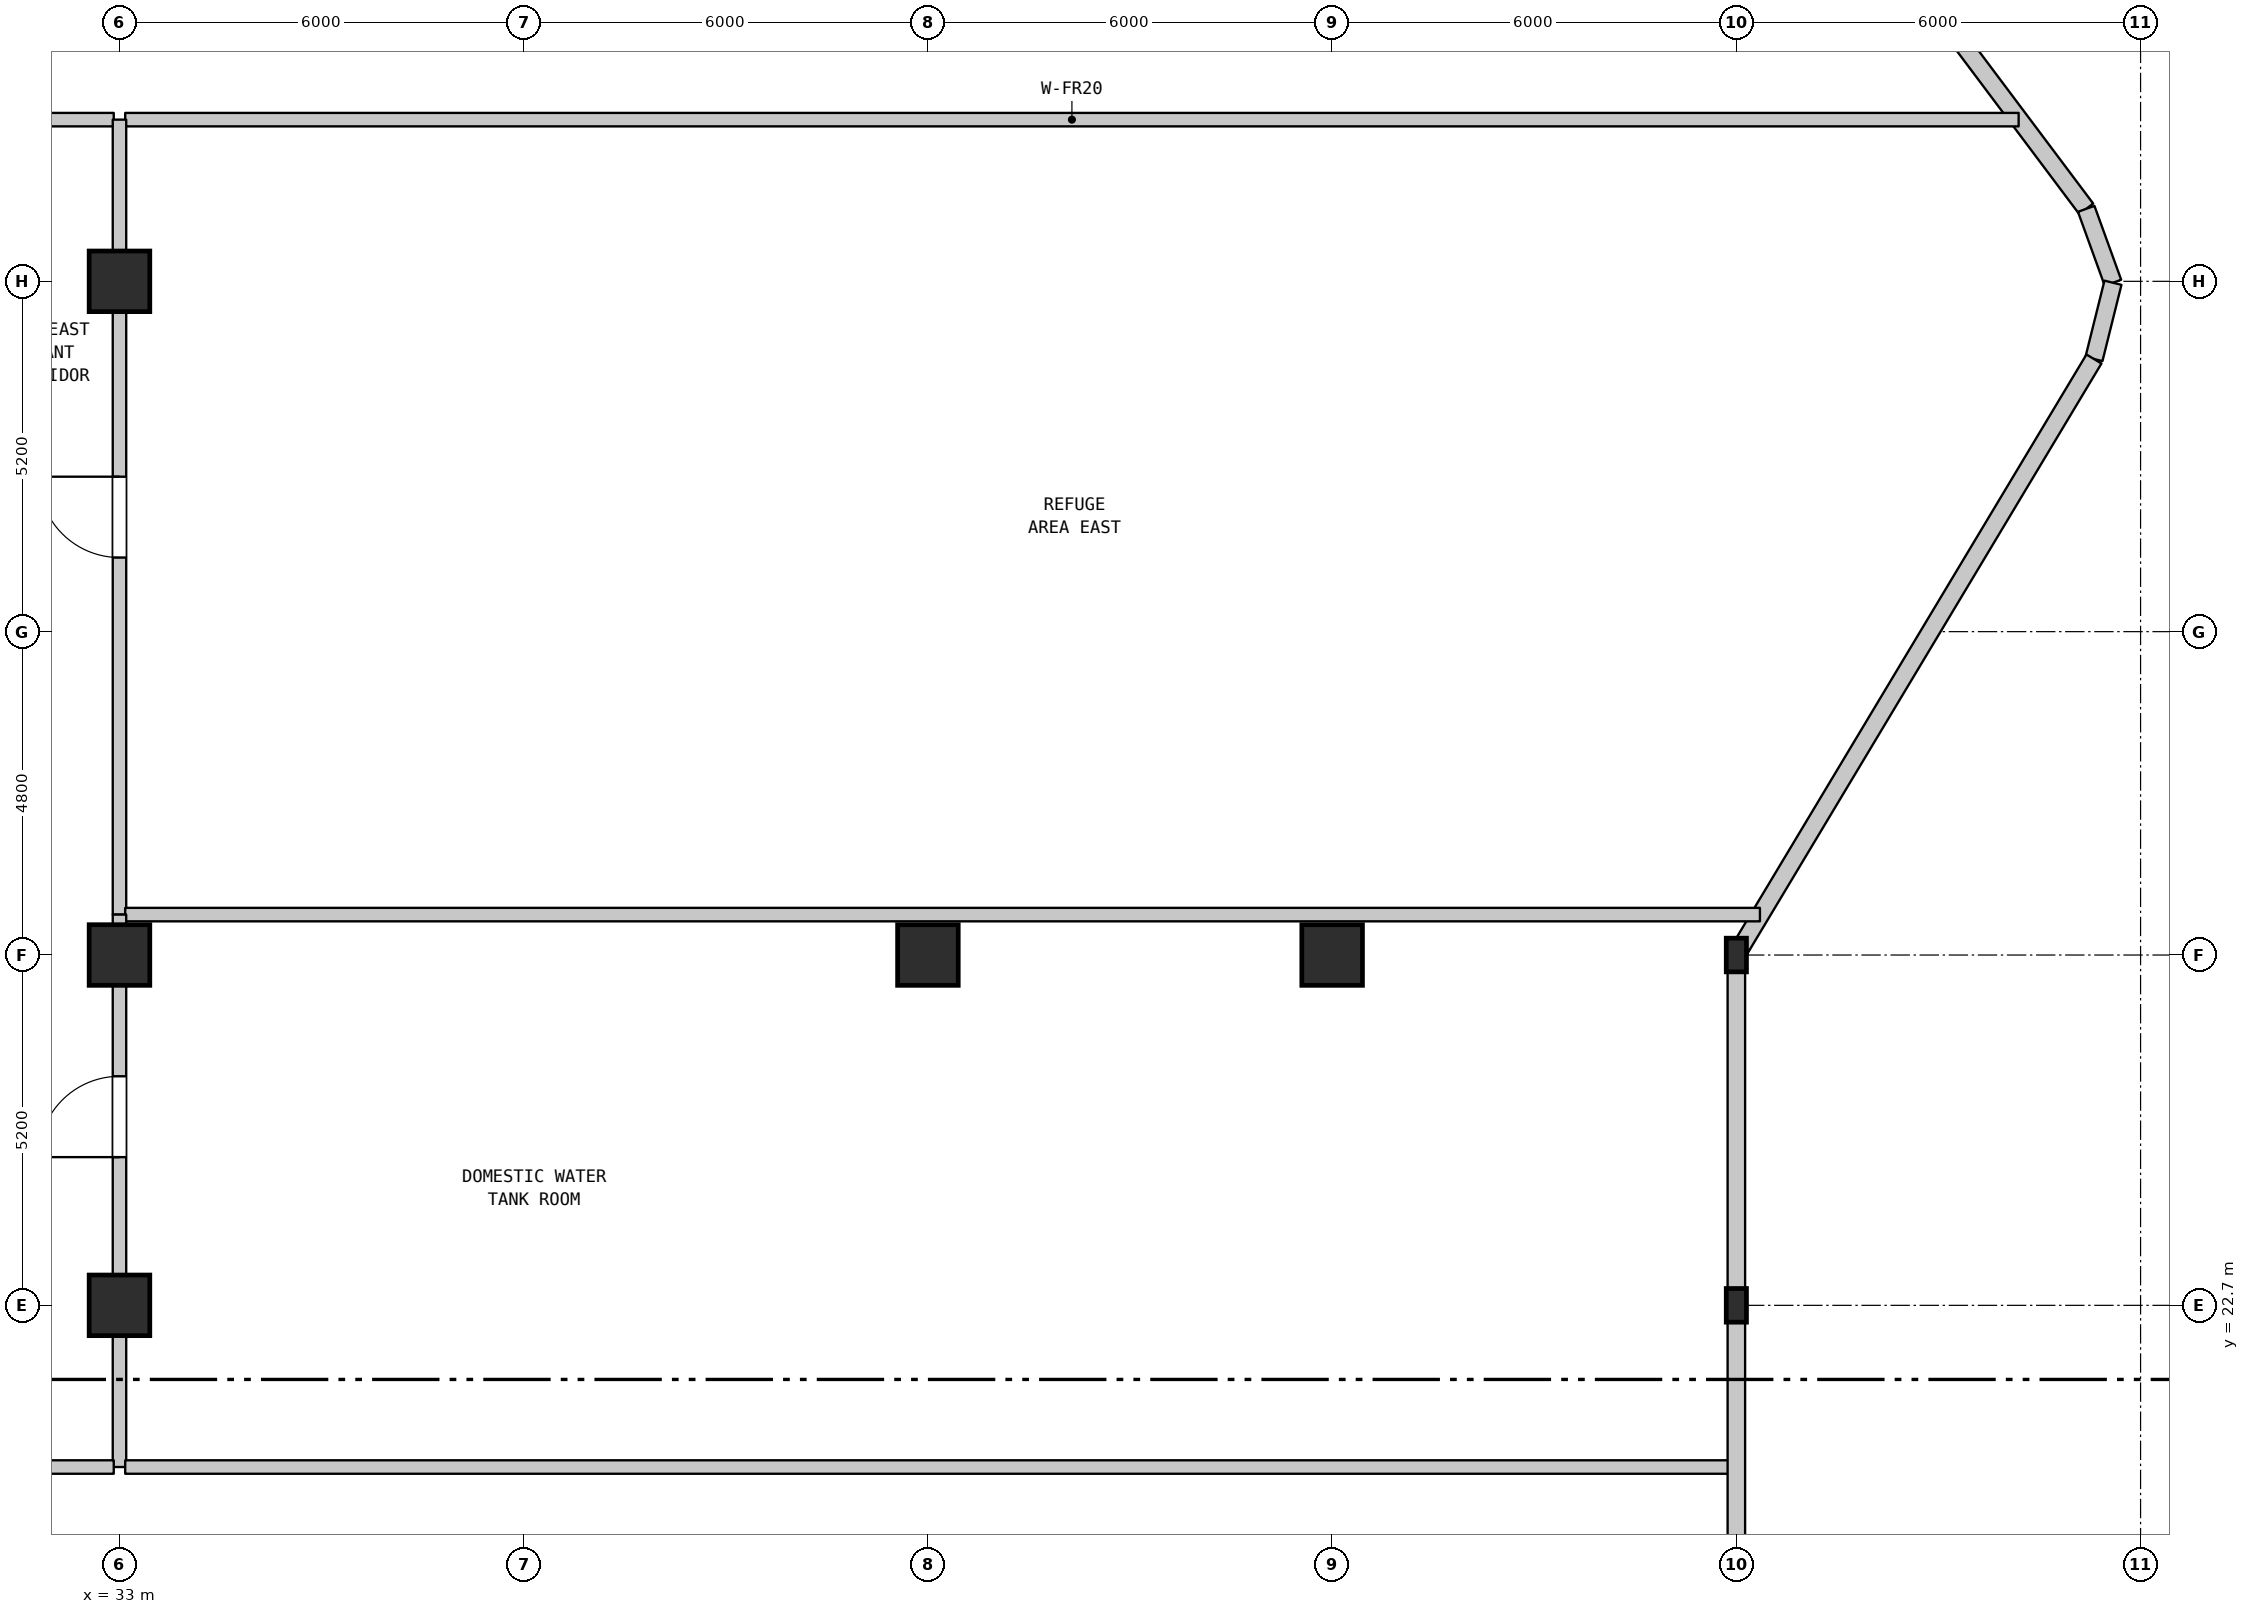
"""IFC4 building model, lengths in metres.
Left out: names, types, materials, properties, quantities, classifications, styles, units other than length and angle.
Written with IfcOpenShell. Run it as: python <this file> out.ifc"""

import sys

from ifc_helpers import new_model, si_unit, direction, frame, frame_2d, origin, origin_2d, place, context, subcontext, project, spatial, rectangle, i_section, extrude, element, fill, save


model = new_model("IFC4")
c1 = context("Model", 3, precision=1e-05, world=origin(), true_north=direction((0.0, 1.0)))
c2 = subcontext(c1, "Body", "Model", "MODEL_VIEW")
j1 = project(units=[si_unit("LENGTHUNIT", "METRE"), si_unit("PLANEANGLEUNIT", "RADIAN")], contexts=[c1])
p1 = place(None, origin())
s1 = spatial("IfcSite", under=j1, at=p1, CompositionType="ELEMENT")
p2 = place(p1, origin())
s2 = spatial("IfcBuilding", under=s1, at=p2, CompositionType="ELEMENT")
p3 = place(p2, frame((0.0, 0.0, 159.4)))
s3 = spatial("IfcBuildingStorey", under=s2, at=p3, CompositionType="ELEMENT", Elevation=159.4)
for number, where, z_axis, x_axis in (
    (1, (33.0, 22.7, 0.0), (0.0, 0.0, 1.0), (1.0, 0.0, 0.0)),
    (2, (33.0, 27.9, 0.0), (0.0, 0.0, 1.0), (1.0, 0.0, 0.0)),
    (3, (33.0, 37.9, 0.0), (0.0, 0.0, 1.0), (1.0, 0.0, 0.0)),
    (4, (45.0, 27.9, 0.0), (0.0, 0.0, 1.0), (1.0, 0.0, 0.0)),
    (5, (51.0, 27.9, 0.0), (0.0, 0.0, 1.0), (1.0, 0.0, 0.0)),
):
    element("IfcColumn", number, at=place(p3, frame(where, z_axis=z_axis, x_axis=x_axis)), inside=s3, PredefinedType="COLUMN", context=c2, shape_type="SweptSolid", body=[
        extrude(rectangle(XDim=0.9, YDim=0.9, at=origin_2d()), origin(), (0.0, 0.0, 1.0), 5.2),
    ])
for number, where, z_axis, x_axis in (
    (6, (57.0, 22.7, 0.0), (0.0, 0.0, 1.0), (1.0, 0.0, 0.0)),
    (7, (57.0, 27.9, 0.0), (0.0, 0.0, 1.0), (1.0, 0.0, 0.0)),
):
    element("IfcColumn", number, at=place(p3, frame(where, z_axis=z_axis, x_axis=x_axis)), inside=s3, PredefinedType="COLUMN", context=c2, shape_type="SweptSolid", body=[
        extrude(i_section(OverallWidth=0.3, OverallDepth=0.5, WebThickness=0.014, FlangeThickness=0.028, FilletRadius=0.027, at=origin_2d()), origin(), (0.0, 0.0, 1.0), 5.2),
    ])
p4 = place(p3, frame((51.6, 53.1, 0.0), z_axis=(0.0, 0.0, 1.0), x_axis=(0.6, -0.8, 0.0)))
e8 = element("IfcWall", 8, at=p4, inside=s3, PredefinedType="STANDARD", context=c2, shape_type="SweptSolid", body=[
    extrude(rectangle(XDim=17.655, YDim=0.26, at=frame_2d((8.828, 0.0))), origin(), (0.0, 0.0, 1.0), 4.89),
])
p5 = place(p3, frame((62.193, 38.976, 0.0), z_axis=(0.0, 0.0, 1.0), x_axis=(0.34023056637, -0.94034204506, 0.0)))
e9 = element("IfcWall", 9, at=p5, inside=s3, PredefinedType="STANDARD", context=c2, shape_type="SweptSolid", body=[
    extrude(rectangle(XDim=1.167, YDim=0.26, at=frame_2d((0.583, 0.0))), origin(), (0.0, 0.0, 1.0), 4.89),
])
p6 = place(p3, frame((62.59, 37.879, 0.0), z_axis=(0.0, 0.0, 1.0), x_axis=(-0.241747572301, -0.970339173324, 0.0)))
e10 = element("IfcWall", 10, at=p6, inside=s3, PredefinedType="STANDARD", context=c2, shape_type="SweptSolid", body=[
    extrude(rectangle(XDim=1.167, YDim=0.26, at=frame_2d((0.583, 0.0))), origin(), (0.0, 0.0, 1.0), 4.89),
])
p7 = place(p3, frame((62.308, 36.747, 0.0), z_axis=(0.0, 0.0, 1.0), x_axis=(-0.514481835924, -0.857501277261, 0.0)))
e11 = element("IfcWall", 11, at=p7, inside=s3, PredefinedType="STANDARD", context=c2, shape_type="SweptSolid", body=[
    extrude(rectangle(XDim=10.317, YDim=0.26, at=frame_2d((5.159, 0.0))), origin(), (0.0, 0.0, 1.0), 4.89),
])
p8 = place(p3, frame((57.0, 27.9, 0.0), z_axis=(0.0, 0.0, 1.0), x_axis=(0.0, -1.0, 0.0)))
e12 = element("IfcWall", 12, at=p8, inside=s3, PredefinedType="STANDARD", context=c2, shape_type="SweptSolid", body=[
    extrude(rectangle(XDim=5.2, YDim=0.26, at=frame_2d((2.6, 0.0))), origin(), (0.0, 0.0, 1.0), 4.89),
])
p9 = place(p3, frame((33.0, 20.3, 0.0), z_axis=(0.0, 0.0, 1.0), x_axis=(0.0, 1.0, 0.0)))
e13 = element("IfcWall", 13, at=p9, inside=s3, PredefinedType="STANDARD", context=c2, shape_type="SweptSolid", body=[
    extrude(rectangle(XDim=7.6, YDim=0.2, at=frame_2d((3.8, 0.0))), origin(), (0.0, 0.0, 1.0), 4.49),
])
p10 = place(p9, frame((4.6, 0.0, 0.0)))
e14 = element("IfcOpeningElement", 14, at=p10, cuts=e13, PredefinedType="OPENING", context=c2, shape_type="SweptSolid", body=[
    extrude(rectangle(XDim=1.2, YDim=2.2, at=frame_2d((0.6, 1.1))), frame((0.0, 0.11, 0.0), z_axis=(0.0, -1.0, 0.0), x_axis=(1.0, 0.0, 0.0)), (0.0, 0.0, 1.0), 0.22),
])
p11 = place(p3, frame((33.0, 28.5, 0.0), z_axis=(0.0, 0.0, 1.0), x_axis=(0.0, 1.0, 0.0)))
e15 = element("IfcWall", 15, at=p11, inside=s3, PredefinedType="STANDARD", context=c2, shape_type="SweptSolid", body=[
    extrude(rectangle(XDim=9.4, YDim=0.2, at=frame_2d((4.7, 0.0))), origin(), (0.0, 0.0, 1.0), 4.39),
])
p12 = place(p11, frame((5.3, 0.0, 0.0)))
e16 = element("IfcOpeningElement", 16, at=p12, cuts=e15, PredefinedType="OPENING", context=c2, shape_type="SweptSolid", body=[
    extrude(rectangle(XDim=1.2, YDim=2.2, at=frame_2d((0.6, 1.1))), frame((0.0, 0.11, 0.0), z_axis=(0.0, -1.0, 0.0), x_axis=(1.0, 0.0, 0.0)), (0.0, 0.0, 1.0), 0.22),
])
p13 = place(p3, frame((12.6, 20.3, 0.0), z_axis=(0.0, 0.0, 1.0), x_axis=(1.0, 0.0, 0.0)))
e17 = element("IfcWall", 17, at=p13, inside=s3, PredefinedType="STANDARD", context=c2, shape_type="SweptSolid", body=[
    extrude(rectangle(XDim=20.315, YDim=0.2, at=frame_2d((10.157, 0.0))), origin(), (0.0, 0.0, 1.0), 4.89),
])
p14 = place(p13, frame((6.8, 0.0, 0.0)))
e18 = element("IfcOpeningElement", 18, at=p14, cuts=e17, PredefinedType="OPENING", context=c2, shape_type="SweptSolid", body=[
    extrude(rectangle(XDim=1.2, YDim=2.2, at=frame_2d((0.6, 1.1))), frame((0.0, 0.11, 0.0), z_axis=(0.0, -1.0, 0.0), x_axis=(1.0, 0.0, 0.0)), (0.0, 0.0, 1.0), 0.22),
])
p15 = place(p13, frame((16.225, 0.0, 0.0)))
e19 = element("IfcOpeningElement", 19, at=p15, cuts=e17, PredefinedType="OPENING", context=c2, shape_type="SweptSolid", body=[
    extrude(rectangle(XDim=1.2, YDim=2.2, at=frame_2d((0.6, 1.1))), frame((0.0, 0.11, 0.0), z_axis=(0.0, -1.0, 0.0), x_axis=(1.0, 0.0, 0.0)), (0.0, 0.0, 1.0), 0.22),
])
p16 = place(p3, frame((33.085, 20.3, 0.0), z_axis=(0.0, 0.0, 1.0), x_axis=(1.0, 0.0, 0.0)))
e20 = element("IfcWall", 20, at=p16, inside=s3, PredefinedType="STANDARD", context=c2, shape_type="SweptSolid", body=[
    extrude(rectangle(XDim=23.905, YDim=0.2, at=frame_2d((11.953, 0.0))), origin(), (0.0, 0.0, 1.0), 4.89),
])
p17 = place(p3, frame((33.085, 28.5, 0.0), z_axis=(0.0, 0.0, 1.0), x_axis=(1.0, 0.0, 0.0)))
e21 = element("IfcWall", 21, at=p17, inside=s3, PredefinedType="STANDARD", context=c2, shape_type="SweptSolid", body=[
    extrude(rectangle(XDim=24.265, YDim=0.2, at=frame_2d((12.133, 0.0))), origin(), (0.0, 0.0, 1.0), 4.89),
])
p18 = place(p3, frame((12.685, 40.3, 0.0), z_axis=(0.0, 0.0, 1.0), x_axis=(1.0, 0.0, 0.0)))
e22 = element("IfcWall", 22, at=p18, inside=s3, PredefinedType="STANDARD", context=c2, shape_type="SweptSolid", body=[
    extrude(rectangle(XDim=20.23, YDim=0.2, at=frame_2d((10.115, 0.0))), origin(), (0.0, 0.0, 1.0), 4.89),
])
p19 = place(p18, frame((12.14, 0.0, 0.0)))
e23 = element("IfcOpeningElement", 23, at=p19, cuts=e22, PredefinedType="OPENING", context=c2, shape_type="SweptSolid", body=[
    extrude(rectangle(XDim=1.2, YDim=2.2, at=frame_2d((0.6, 1.1))), frame((0.0, 0.11, 0.0), z_axis=(0.0, -1.0, 0.0), x_axis=(1.0, 0.0, 0.0)), (0.0, 0.0, 1.0), 0.22),
])
p20 = place(p3, frame((33.085, 40.3, 0.0), z_axis=(0.0, 0.0, 1.0), x_axis=(1.0, 0.0, 0.0)))
e24 = element("IfcWall", 24, at=p20, inside=s3, PredefinedType="STANDARD", context=c2, shape_type="SweptSolid", body=[
    extrude(rectangle(XDim=28.105, YDim=0.2, at=frame_2d((14.052, 0.0))), origin(), (0.0, 0.0, 1.0), 4.89),
])
p21 = place(p3, frame((57.0, 22.7, 0.0), z_axis=(0.0, 0.0, 1.0), x_axis=(0.0, -1.0, 0.0)))
e25 = element("IfcWall", 25, at=p21, inside=s3, PredefinedType="STANDARD", context=c2, shape_type="SweptSolid", body=[
    extrude(rectangle(XDim=16.0, YDim=0.26, at=frame_2d((8.0, 0.0))), origin(), (0.0, 0.0, 1.0), 4.49),
])
p22 = place(p3, frame((33.0, 27.9, 0.0), z_axis=(0.0, 0.0, 1.0), x_axis=(0.0, 1.0, 0.0)))
e26 = element("IfcWall", 26, at=p22, inside=s3, PredefinedType="STANDARD", context=c2, shape_type="SweptSolid", body=[
    extrude(rectangle(XDim=0.6, YDim=0.2, at=frame_2d((0.3, 0.0))), origin(), (0.0, 0.0, 1.0), 4.39),
])
p23 = place(p3, frame((33.0, 37.9, 0.0), z_axis=(0.0, 0.0, 1.0), x_axis=(0.0, 1.0, 0.0)))
e27 = element("IfcWall", 27, at=p23, inside=s3, PredefinedType="STANDARD", context=c2, shape_type="SweptSolid", body=[
    extrude(rectangle(XDim=2.4, YDim=0.2, at=frame_2d((1.2, 0.0))), origin(), (0.0, 0.0, 1.0), 4.29),
])
p24 = place(p10, origin())
e28 = element("IfcDoor", 28, at=p24, inside=s3, OperationType="SINGLE_SWING_LEFT", PredefinedType="DOOR", context=c2, shape_type="SweptSolid", body=[
    extrude(rectangle(XDim=1.2, YDim=2.2, at=frame_2d((0.6, 1.1))), frame((0.0, 0.025, 0.0), z_axis=(0.0, -1.0, 0.0), x_axis=(1.0, 0.0, 0.0)), (0.0, 0.0, 1.0), 0.05),
])
fill(e14, e28)
p25 = place(p12, origin())
e29 = element("IfcDoor", 29, at=p25, inside=s3, OperationType="SINGLE_SWING_RIGHT", PredefinedType="DOOR", context=c2, shape_type="SweptSolid", body=[
    extrude(rectangle(XDim=1.2, YDim=2.2, at=frame_2d((0.6, 1.1))), frame((0.0, 0.025, 0.0), z_axis=(0.0, -1.0, 0.0), x_axis=(1.0, 0.0, 0.0)), (0.0, 0.0, 1.0), 0.05),
])
fill(e16, e29)
save(model, sys.argv[1])
